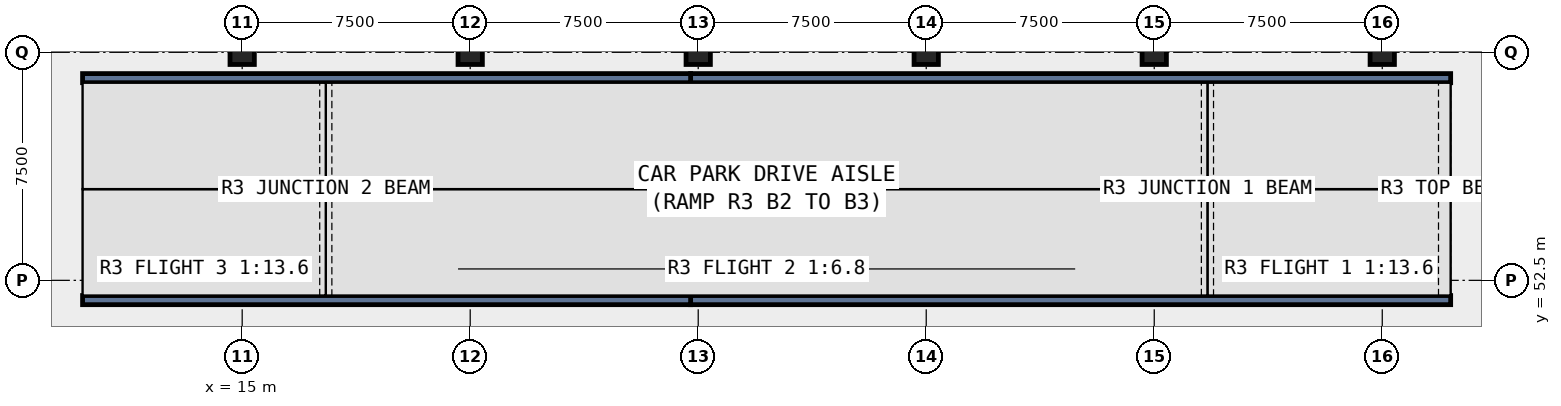
"""IFC4 building model, lengths in metres.
Left out: names, types, materials, properties, quantities, classifications, styles, units other than length and angle.
Written with IfcOpenShell. Run it as: python <this file> out.ifc"""

import sys

from ifc_helpers import new_model, si_unit, direction, frame, frame_2d, origin, origin_2d, place, context, subcontext, project, spatial, rectangle, extrude, element, save


model = new_model("IFC4")
c1 = context("Model", 3, precision=1e-05, world=origin(), true_north=direction((0.0, 1.0)))
c2 = subcontext(c1, "Body", "Model", "MODEL_VIEW")
j1 = project(units=[si_unit("LENGTHUNIT", "METRE"), si_unit("PLANEANGLEUNIT", "RADIAN")], contexts=[c1])
p1 = place(None, origin())
s1 = spatial("IfcSite", under=j1, at=p1, CompositionType="ELEMENT")
p2 = place(p1, origin())
s2 = spatial("IfcBuilding", under=s1, at=p2, CompositionType="ELEMENT")
p3 = place(p2, frame((0.0, 0.0, -16.5)))
s3 = spatial("IfcBuildingStorey", under=s2, at=p3, CompositionType="ELEMENT", Elevation=-16.5)
for number, where, z_axis, x_axis in (
    (1, (15.0, 60.0, -0.4), (0.0, 0.0, 1.0), (1.0, 0.0, 0.0)),
    (2, (22.5, 60.0, -0.4), (0.0, 0.0, 1.0), (1.0, 0.0, 0.0)),
    (3, (30.0, 60.0, -0.4), (0.0, 0.0, 1.0), (1.0, 0.0, 0.0)),
    (4, (37.5, 60.0, -0.4), (0.0, 0.0, 1.0), (1.0, 0.0, 0.0)),
    (5, (45.0, 60.0, -0.4), (0.0, 0.0, 1.0), (1.0, 0.0, 0.0)),
    (6, (52.5, 60.0, -0.4), (0.0, 0.0, 1.0), (1.0, 0.0, 0.0)),
):
    element("IfcColumn", number, at=place(p3, frame(where, z_axis=z_axis, x_axis=x_axis)), inside=s3, PredefinedType="COLUMN", context=c2, shape_type="SweptSolid", body=[
        extrude(rectangle(XDim=0.8, YDim=0.8, at=origin_2d()), origin(), (0.0, 0.0, 1.0), 5.48),
    ])
for number, where, z_axis, x_axis in (
    (7, (29.75, 51.85, -0.4), (0.0, 0.0, 1.0), (1.0, 0.0, 0.0)),
    (8, (29.75, 59.15, -0.4), (0.0, 0.0, 1.0), (1.0, 0.0, 0.0)),
):
    element("IfcWall", number, at=place(p3, frame(where, z_axis=z_axis, x_axis=x_axis)), inside=s3, PredefinedType="SOLIDWALL", context=c2, shape_type="SweptSolid", body=[
        extrude(rectangle(XDim=25.0, YDim=0.3, at=frame_2d((12.5, 0.0))), origin(), (0.0, 0.0, 1.0), 5.9),
    ])
for number, where, z_axis, x_axis in (
    (9, (9.75, 51.85, -0.4), (0.0, 0.0, 1.0), (1.0, 0.0, 0.0)),
    (10, (9.75, 59.15, -0.4), (0.0, 0.0, 1.0), (1.0, 0.0, 0.0)),
):
    element("IfcWall", number, at=place(p3, frame(where, z_axis=z_axis, x_axis=x_axis)), inside=s3, PredefinedType="SOLIDWALL", context=c2, shape_type="SweptSolid", body=[
        extrude(rectangle(XDim=20.0, YDim=0.3, at=frame_2d((10.0, 0.0))), origin(), (0.0, 0.0, 1.0), 5.48),
    ])
save(model, sys.argv[1])
